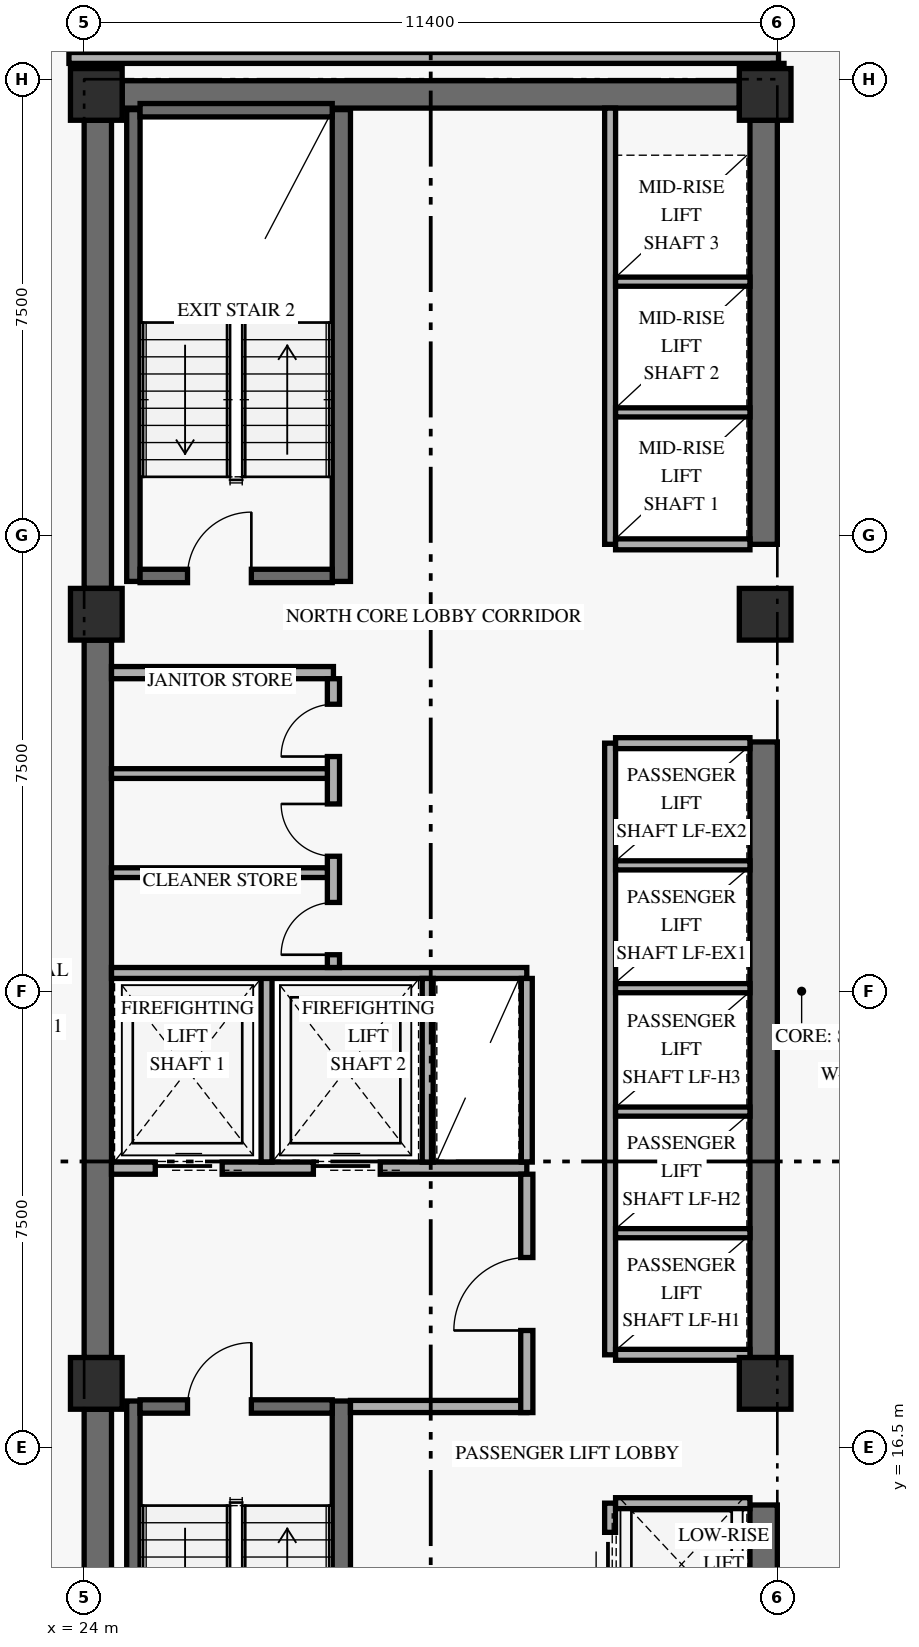
"""IFC4 building model, lengths in metres.
Left out: names, types, materials, properties, quantities, classifications, styles, units other than length and angle.
Written with IfcOpenShell. Run it as: python <this file> out.ifc"""

import sys

from ifc_helpers import new_model, si_unit, direction, frame, frame_2d, origin, origin_2d, place, context, subcontext, project, spatial, rectangle, extrude, element, fill, save


model = new_model("IFC4")
c1 = context("Model", 3, precision=1e-05, world=origin(), true_north=direction((0.0, 1.0)))
c2 = subcontext(c1, "Body", "Model", "MODEL_VIEW")
j1 = project(units=[si_unit("LENGTHUNIT", "METRE"), si_unit("PLANEANGLEUNIT", "RADIAN")], contexts=[c1])
p1 = place(None, origin())
s1 = spatial("IfcSite", under=j1, at=p1, CompositionType="ELEMENT")
p2 = place(p1, origin())
s2 = spatial("IfcBuilding", under=s1, at=p2, CompositionType="ELEMENT")
p3 = place(p2, frame((0.0, 0.0, 64.2)))
s3 = spatial("IfcBuildingStorey", under=s2, at=p3, CompositionType="ELEMENT", Elevation=64.2)
p4 = place(p3, frame((24.225, 9.675, 0.0), z_axis=(0.0, 0.0, 1.0), x_axis=(0.0, 1.0, 0.0)))
e1 = element("IfcWall", 1, at=p4, inside=s3, PredefinedType="SHEAR", context=c2, shape_type="SweptSolid", body=[
    extrude(rectangle(XDim=7.45, YDim=0.45, at=frame_2d((3.725, 0.0))), origin(), (0.0, 0.0, 1.0), 2.667),
])
p5 = place(p3, frame((24.225, 17.975, 0.0), z_axis=(0.0, 0.0, 1.0), x_axis=(0.0, 1.0, 0.0)))
e2 = element("IfcWall", 2, at=p5, inside=s3, PredefinedType="SHEAR", context=c2, shape_type="SweptSolid", body=[
    extrude(rectangle(XDim=11.8, YDim=0.45, at=frame_2d((5.9, 0.0))), origin(), (0.0, 0.0, 1.0), 2.667),
])
p6 = place(p3, frame((24.225, 30.625, 0.0), z_axis=(0.0, 0.0, 1.0), x_axis=(0.0, 1.0, 0.0)))
e3 = element("IfcWall", 3, at=p6, inside=s3, PredefinedType="SHEAR", context=c2, shape_type="SweptSolid", body=[
    extrude(rectangle(XDim=7.7, YDim=0.45, at=frame_2d((3.85, 0.0))), origin(), (0.0, 0.0, 1.0), 2.667),
])
p7 = place(p3, frame((35.175, 9.675, 0.0), z_axis=(0.0, 0.0, 1.0), x_axis=(0.0, 1.0, 0.0)))
e4 = element("IfcWall", 4, at=p7, inside=s3, PredefinedType="SHEAR", context=c2, shape_type="SweptSolid", body=[
    extrude(rectangle(XDim=5.875, YDim=0.45, at=frame_2d((2.938, 0.0))), origin(), (0.0, 0.0, 1.0), 2.667),
])
p8 = place(p3, frame((35.175, 17.975, 0.0), z_axis=(0.0, 0.0, 1.0), x_axis=(0.0, 1.0, 0.0)))
e5 = element("IfcWall", 5, at=p8, inside=s3, PredefinedType="SHEAR", context=c2, shape_type="SweptSolid", body=[
    extrude(rectangle(XDim=10.125, YDim=0.45, at=frame_2d((5.062, 0.0))), origin(), (0.0, 0.0, 1.0), 2.667),
])
p9 = place(p3, frame((35.175, 31.35, 0.0), z_axis=(0.0, 0.0, 1.0), x_axis=(0.0, 1.0, 0.0)))
e6 = element("IfcWall", 6, at=p9, inside=s3, PredefinedType="SHEAR", context=c2, shape_type="SweptSolid", body=[
    extrude(rectangle(XDim=6.975, YDim=0.45, at=frame_2d((3.487, 0.0))), origin(), (0.0, 0.0, 1.0), 2.667),
])
p10 = place(p3, frame((24.625, 38.75, 0.0), z_axis=(0.0, 0.0, 1.0), x_axis=(1.0, 0.0, 0.0)))
e7 = element("IfcWall", 7, at=p10, inside=s3, PredefinedType="SHEAR", context=c2, shape_type="SweptSolid", body=[
    extrude(rectangle(XDim=10.15, YDim=0.45, at=frame_2d((5.075, 0.0))), origin(), (0.0, 0.0, 1.0), 3.36),
])
p11 = place(p3, frame((24.81, 9.5, 0.0), z_axis=(0.0, 0.0, 1.0), x_axis=(0.0, 1.0, 0.0)))
e8 = element("IfcWall", 8, at=p11, inside=s3, PredefinedType="SHEAR", context=c2, shape_type="SweptSolid", body=[
    extrude(rectangle(XDim=7.76, YDim=0.22, at=frame_2d((3.88, 0.0))), origin(), (0.0, 0.0, 1.0), 3.36),
])
p12 = place(p3, frame((28.23, 9.5, 0.0), z_axis=(0.0, 0.0, 1.0), x_axis=(0.0, 1.0, 0.0)))
e9 = element("IfcWall", 9, at=p12, inside=s3, PredefinedType="SHEAR", context=c2, shape_type="SweptSolid", body=[
    extrude(rectangle(XDim=7.76, YDim=0.3, at=frame_2d((3.88, 0.0))), origin(), (0.0, 0.0, 1.0), 3.36),
])
p13 = place(p3, frame((24.92, 17.17, 0.0), z_axis=(0.0, 0.0, 1.0), x_axis=(1.0, 0.0, 0.0)))
e10 = element("IfcWall", 10, at=p13, inside=s3, PredefinedType="SHEAR", context=c2, shape_type="SweptSolid", body=[
    extrude(rectangle(XDim=3.16, YDim=0.22, at=frame_2d((1.58, 0.0))), origin(), (0.0, 0.0, 1.0), 3.36),
])
p14 = place(p13, frame((0.78, 0.0, 0.0)))
e11 = element("IfcOpeningElement", 11, at=p14, cuts=e10, PredefinedType="OPENING", context=c2, shape_type="SweptSolid", body=[
    extrude(rectangle(XDim=1.05, YDim=2.15, at=frame_2d((0.525, 1.075))), frame((0.0, 0.12, 0.0), z_axis=(0.0, -1.0, 0.0), x_axis=(1.0, 0.0, 0.0)), (0.0, 0.0, 1.0), 0.24),
])
p15 = place(p3, frame((24.81, 30.74, 0.0), z_axis=(0.0, 0.0, 1.0), x_axis=(0.0, 1.0, 0.0)))
e12 = element("IfcWall", 12, at=p15, inside=s3, PredefinedType="SHEAR", context=c2, shape_type="SweptSolid", body=[
    extrude(rectangle(XDim=7.76, YDim=0.22, at=frame_2d((3.88, 0.0))), origin(), (0.0, 0.0, 1.0), 3.36),
])
p16 = place(p3, frame((28.23, 30.74, 0.0), z_axis=(0.0, 0.0, 1.0), x_axis=(0.0, 1.0, 0.0)))
e13 = element("IfcWall", 13, at=p16, inside=s3, PredefinedType="SHEAR", context=c2, shape_type="SweptSolid", body=[
    extrude(rectangle(XDim=7.76, YDim=0.3, at=frame_2d((3.88, 0.0))), origin(), (0.0, 0.0, 1.0), 3.36),
])
p17 = place(p3, frame((24.92, 30.83, 0.0), z_axis=(0.0, 0.0, 1.0), x_axis=(1.0, 0.0, 0.0)))
e14 = element("IfcWall", 14, at=p17, inside=s3, PredefinedType="SHEAR", context=c2, shape_type="SweptSolid", body=[
    extrude(rectangle(XDim=3.16, YDim=0.22, at=frame_2d((1.58, 0.0))), origin(), (0.0, 0.0, 1.0), 3.36),
])
p18 = place(p17, frame((0.78, 0.0, 0.0)))
e15 = element("IfcOpeningElement", 15, at=p18, cuts=e14, PredefinedType="OPENING", context=c2, shape_type="SweptSolid", body=[
    extrude(rectangle(XDim=1.05, YDim=2.15, at=frame_2d((0.525, 1.075))), frame((0.0, 0.12, 0.0), z_axis=(0.0, -1.0, 0.0), x_axis=(1.0, 0.0, 0.0)), (0.0, 0.0, 1.0), 0.24),
])
p19 = place(p3, frame((24.92, 38.49, 0.0), z_axis=(0.0, 0.0, 1.0), x_axis=(1.0, 0.0, 0.0)))
e16 = element("IfcWall", 16, at=p19, inside=s3, PredefinedType="SHEAR", context=c2, shape_type="SweptSolid", body=[
    extrude(rectangle(XDim=3.16, YDim=0.22, at=frame_2d((1.58, 0.0))), origin(), (0.0, 0.0, 1.0), 3.36),
])
for number, where, z_axis, x_axis in (
    (17, (24.2, 17.55, 0.0), (0.0, 0.0, 1.0), (1.0, 0.0, 0.0)),
    (18, (24.2, 30.2, 0.0), (0.0, 0.0, 1.0), (1.0, 0.0, 0.0)),
    (19, (24.2, 38.75, 0.0), (0.0, 0.0, 1.0), (1.0, 0.0, 0.0)),
    (20, (35.2, 17.55, 0.0), (0.0, 0.0, 1.0), (1.0, 0.0, 0.0)),
    (21, (35.2, 30.2, 0.0), (0.0, 0.0, 1.0), (1.0, 0.0, 0.0)),
    (22, (35.2, 38.75, 0.0), (0.0, 0.0, 1.0), (1.0, 0.0, 0.0)),
):
    element("IfcColumn", number, at=place(p3, frame(where, z_axis=z_axis, x_axis=x_axis)), inside=s3, PredefinedType="COLUMN", context=c2, shape_type="SweptSolid", body=[
        extrude(rectangle(XDim=0.85, YDim=0.85, at=origin_2d()), origin(), (0.0, 0.0, 1.0), 3.6),
    ])
p20 = place(p3, frame((24.45, 21.09, 0.0), z_axis=(0.0, 0.0, 1.0), x_axis=(1.0, 0.0, 0.0)))
e23 = element("IfcWall", 23, at=p20, inside=s3, PredefinedType="STANDARD", context=c2, shape_type="SweptSolid", body=[
    extrude(rectangle(XDim=6.83, YDim=0.2, at=frame_2d((3.415, 0.0))), origin(), (0.0, 0.0, 1.0), 3.36),
])
p21 = place(p20, frame((0.72, 0.0, 0.0)))
e24 = element("IfcOpeningElement", 24, at=p21, cuts=e23, PredefinedType="OPENING", context=c2, shape_type="SweptSolid", body=[
    extrude(rectangle(XDim=1.1, YDim=2.2, at=frame_2d((0.55, 1.1))), frame((0.0, 0.11, 0.0), z_axis=(0.0, -1.0, 0.0), x_axis=(1.0, 0.0, 0.0)), (0.0, 0.0, 1.0), 0.22),
])
p22 = place(p20, frame((3.32, 0.0, 0.0)))
e25 = element("IfcOpeningElement", 25, at=p22, cuts=e23, PredefinedType="OPENING", context=c2, shape_type="SweptSolid", body=[
    extrude(rectangle(XDim=1.1, YDim=2.2, at=frame_2d((0.55, 1.1))), frame((0.0, 0.11, 0.0), z_axis=(0.0, -1.0, 0.0), x_axis=(1.0, 0.0, 0.0)), (0.0, 0.0, 1.0), 0.22),
])
p23 = place(p3, frame((28.38, 17.17, 0.0), z_axis=(0.0, 0.0, 1.0), x_axis=(1.0, 0.0, 0.0)))
e26 = element("IfcWall", 26, at=p23, inside=s3, PredefinedType="STANDARD", context=c2, shape_type="SweptSolid", body=[
    extrude(rectangle(XDim=2.9, YDim=0.2, at=frame_2d((1.45, 0.0))), origin(), (0.0, 0.0, 1.0), 3.36),
])
p24 = place(p3, frame((31.28, 17.07, 0.0), z_axis=(0.0, 0.0, 1.0), x_axis=(0.0, 1.0, 0.0)))
e27 = element("IfcWall", 27, at=p24, inside=s3, PredefinedType="STANDARD", context=c2, shape_type="SweptSolid", body=[
    extrude(rectangle(XDim=3.92, YDim=0.2, at=frame_2d((1.96, 0.0))), origin(), (0.0, 0.0, 1.0), 2.649),
])
p25 = place(p24, frame((1.35, 0.0, 0.0)))
e28 = element("IfcOpeningElement", 28, at=p25, cuts=e27, PredefinedType="OPENING", context=c2, shape_type="SweptSolid", body=[
    extrude(rectangle(XDim=1.2, YDim=2.15, at=frame_2d((0.6, 1.075))), frame((0.0, 0.11, 0.0), z_axis=(0.0, -1.0, 0.0), x_axis=(1.0, 0.0, 0.0)), (0.0, 0.0, 1.0), 0.22),
])
p26 = place(p3, frame((27.0, 21.19, 0.0), z_axis=(0.0, 0.0, 1.0), x_axis=(0.0, 1.0, 0.0)))
e29 = element("IfcWall", 29, at=p26, inside=s3, PredefinedType="STANDARD", context=c2, shape_type="SweptSolid", body=[
    extrude(rectangle(XDim=3.11, YDim=0.18, at=frame_2d((1.555, 0.0))), origin(), (0.0, 0.0, 1.0), 3.36),
])
p27 = place(p3, frame((24.45, 24.3, 0.0), z_axis=(0.0, 0.0, 1.0), x_axis=(1.0, 0.0, 0.0)))
e30 = element("IfcWall", 30, at=p27, inside=s3, PredefinedType="STANDARD", context=c2, shape_type="SweptSolid", body=[
    extrude(rectangle(XDim=6.83, YDim=0.18, at=frame_2d((3.415, 0.0))), origin(), (0.0, 0.0, 1.0), 3.36),
])
for number, where, z_axis, x_axis in (
    (31, (29.65, 21.19, 0.0), (0.0, 0.0, 1.0), (0.0, 1.0, 0.0)),
    (32, (31.28, 21.19, 0.0), (0.0, 0.0, 1.0), (0.0, 1.0, 0.0)),
):
    element("IfcWall", number, at=place(p3, frame(where, z_axis=z_axis, x_axis=x_axis)), inside=s3, PredefinedType="STANDARD", context=c2, shape_type="SweptSolid", body=[
        extrude(rectangle(XDim=3.02, YDim=0.18, at=frame_2d((1.51, 0.0))), origin(), (0.0, 0.0, 1.0), 3.36),
    ])
p28 = place(p3, frame((24.45, 29.24, 0.0), z_axis=(0.0, 0.0, 1.0), x_axis=(1.0, 0.0, 0.0)))
e33 = element("IfcWall", 33, at=p28, inside=s3, PredefinedType="STANDARD", context=c2, shape_type="SweptSolid", body=[
    extrude(rectangle(XDim=3.65, YDim=0.2, at=frame_2d((1.825, 0.0))), origin(), (0.0, 0.0, 1.0), 3.36),
])
p29 = place(p3, frame((28.1, 24.39, 0.0), z_axis=(0.0, 0.0, 1.0), x_axis=(0.0, 1.0, 0.0)))
e34 = element("IfcWall", 34, at=p29, inside=s3, PredefinedType="STANDARD", context=c2, shape_type="SweptSolid", body=[
    extrude(rectangle(XDim=4.75, YDim=0.2, at=frame_2d((2.375, 0.0))), origin(), (0.0, 0.0, 1.0), 3.36),
])
p30 = place(p29, frame((0.21, 0.0, 0.0)))
e35 = element("IfcOpeningElement", 35, at=p30, cuts=e34, PredefinedType="OPENING", context=c2, shape_type="SweptSolid", body=[
    extrude(rectangle(XDim=0.86, YDim=2.1, at=frame_2d((0.43, 1.05))), frame((0.0, 0.11, 0.0), z_axis=(0.0, -1.0, 0.0), x_axis=(1.0, 0.0, 0.0)), (0.0, 0.0, 1.0), 0.22),
])
p31 = place(p29, frame((1.83, 0.0, 0.0)))
e36 = element("IfcOpeningElement", 36, at=p31, cuts=e34, PredefinedType="OPENING", context=c2, shape_type="SweptSolid", body=[
    extrude(rectangle(XDim=0.86, YDim=2.1, at=frame_2d((0.43, 1.05))), frame((0.0, 0.11, 0.0), z_axis=(0.0, -1.0, 0.0), x_axis=(1.0, 0.0, 0.0)), (0.0, 0.0, 1.0), 0.22),
])
p32 = place(p29, frame((3.47, 0.0, 0.0)))
e37 = element("IfcOpeningElement", 37, at=p32, cuts=e34, PredefinedType="OPENING", context=c2, shape_type="SweptSolid", body=[
    extrude(rectangle(XDim=0.86, YDim=2.1, at=frame_2d((0.43, 1.05))), frame((0.0, 0.11, 0.0), z_axis=(0.0, -1.0, 0.0), x_axis=(1.0, 0.0, 0.0)), (0.0, 0.0, 1.0), 0.22),
])
for number, where, z_axis, x_axis in (
    (38, (24.45, 25.95, 0.0), (0.0, 0.0, 1.0), (1.0, 0.0, 0.0)),
    (39, (24.45, 27.58, 0.0), (0.0, 0.0, 1.0), (1.0, 0.0, 0.0)),
):
    element("IfcWall", number, at=place(p3, frame(where, z_axis=z_axis, x_axis=x_axis)), inside=s3, PredefinedType="PARTITIONING", context=c2, shape_type="SweptSolid", body=[
        extrude(rectangle(XDim=3.55, YDim=0.16, at=frame_2d((1.775, 0.0))), origin(), (0.0, 0.0, 1.0), 3.36),
    ])
p33 = place(p3, frame((32.65, 9.5, 0.0), z_axis=(0.0, 0.0, 1.0), x_axis=(0.0, 1.0, 0.0)))
e40 = element("IfcWall", 40, at=p33, inside=s3, PredefinedType="STANDARD", context=c2, shape_type="SweptSolid", body=[
    extrude(rectangle(XDim=6.08, YDim=0.18, at=frame_2d((3.04, 0.0))), origin(), (0.0, 0.0, 1.0), 3.36),
])
p34 = place(p33, frame((0.55, 0.0, 0.0)))
e41 = element("IfcOpeningElement", 41, at=p34, cuts=e40, PredefinedType="OPENING", context=c2, shape_type="SweptSolid", body=[
    extrude(rectangle(XDim=1.05, YDim=2.2, at=frame_2d((0.525, 1.1))), frame((0.0, 0.1, 0.0), z_axis=(0.0, -1.0, 0.0), x_axis=(1.0, 0.0, 0.0)), (0.0, 0.0, 1.0), 0.2),
])
p35 = place(p33, frame((2.55, 0.0, 0.0)))
e42 = element("IfcOpeningElement", 42, at=p35, cuts=e40, PredefinedType="OPENING", context=c2, shape_type="SweptSolid", body=[
    extrude(rectangle(XDim=1.05, YDim=2.2, at=frame_2d((0.525, 1.1))), frame((0.0, 0.1, 0.0), z_axis=(0.0, -1.0, 0.0), x_axis=(1.0, 0.0, 0.0)), (0.0, 0.0, 1.0), 0.2),
])
p36 = place(p33, frame((4.55, 0.0, 0.0)))
e43 = element("IfcOpeningElement", 43, at=p36, cuts=e40, PredefinedType="OPENING", context=c2, shape_type="SweptSolid", body=[
    extrude(rectangle(XDim=1.05, YDim=2.2, at=frame_2d((0.525, 1.1))), frame((0.0, 0.1, 0.0), z_axis=(0.0, -1.0, 0.0), x_axis=(1.0, 0.0, 0.0)), (0.0, 0.0, 1.0), 0.2),
])
p37 = place(p3, frame((32.74, 15.58, 0.0), z_axis=(0.0, 0.0, 1.0), x_axis=(1.0, 0.0, 0.0)))
e44 = element("IfcWall", 44, at=p37, inside=s3, PredefinedType="STANDARD", context=c2, shape_type="SweptSolid", body=[
    extrude(rectangle(XDim=2.21, YDim=0.18, at=frame_2d((1.105, 0.0))), origin(), (0.0, 0.0, 1.0), 3.36),
])
p38 = place(p3, frame((32.65, 18.02, 0.0), z_axis=(0.0, 0.0, 1.0), x_axis=(0.0, 1.0, 0.0)))
e45 = element("IfcWall", 45, at=p38, inside=s3, PredefinedType="STANDARD", context=c2, shape_type="SweptSolid", body=[
    extrude(rectangle(XDim=10.06, YDim=0.18, at=frame_2d((5.03, 0.0))), origin(), (0.0, 0.0, 1.0), 3.36),
])
for number, where, z_axis, x_axis in (
    (46, (32.74, 18.02, 0.0), (0.0, 0.0, 1.0), (1.0, 0.0, 0.0)),
    (47, (32.74, 28.08, 0.0), (0.0, 0.0, 1.0), (1.0, 0.0, 0.0)),
):
    element("IfcWall", number, at=place(p3, frame(where, z_axis=z_axis, x_axis=x_axis)), inside=s3, PredefinedType="STANDARD", context=c2, shape_type="SweptSolid", body=[
        extrude(rectangle(XDim=2.21, YDim=0.18, at=frame_2d((1.105, 0.0))), origin(), (0.0, 0.0, 1.0), 3.36),
    ])
for number, where, z_axis, x_axis in (
    (48, (32.74, 20.02, 0.0), (0.0, 0.0, 1.0), (1.0, 0.0, 0.0)),
    (49, (32.74, 22.02, 0.0), (0.0, 0.0, 1.0), (1.0, 0.0, 0.0)),
    (50, (32.74, 24.05, 0.0), (0.0, 0.0, 1.0), (1.0, 0.0, 0.0)),
    (51, (32.74, 26.07, 0.0), (0.0, 0.0, 1.0), (1.0, 0.0, 0.0)),
):
    element("IfcWall", number, at=place(p3, frame(where, z_axis=z_axis, x_axis=x_axis)), inside=s3, PredefinedType="STANDARD", context=c2, shape_type="SweptSolid", body=[
        extrude(rectangle(XDim=2.21, YDim=0.15, at=frame_2d((1.105, 0.0))), origin(), (0.0, 0.0, 1.0), 3.36),
    ])
p39 = place(p3, frame((32.65, 31.35, 0.0), z_axis=(0.0, 0.0, 1.0), x_axis=(0.0, 1.0, 0.0)))
e52 = element("IfcWall", 52, at=p39, inside=s3, PredefinedType="STANDARD", context=c2, shape_type="SweptSolid", body=[
    extrude(rectangle(XDim=7.175, YDim=0.18, at=frame_2d((3.587, 0.0))), origin(), (0.0, 0.0, 1.0), 3.36),
])
p40 = place(p3, frame((32.74, 31.35, 0.0), z_axis=(0.0, 0.0, 1.0), x_axis=(1.0, 0.0, 0.0)))
e53 = element("IfcWall", 53, at=p40, inside=s3, PredefinedType="STANDARD", context=c2, shape_type="SweptSolid", body=[
    extrude(rectangle(XDim=2.21, YDim=0.18, at=frame_2d((1.105, 0.0))), origin(), (0.0, 0.0, 1.0), 3.36),
])
for number, where, z_axis, x_axis in (
    (54, (32.74, 33.52, 0.0), (0.0, 0.0, 1.0), (1.0, 0.0, 0.0)),
    (55, (32.74, 35.67, 0.0), (0.0, 0.0, 1.0), (1.0, 0.0, 0.0)),
):
    element("IfcWall", number, at=place(p3, frame(where, z_axis=z_axis, x_axis=x_axis)), inside=s3, PredefinedType="STANDARD", context=c2, shape_type="SweptSolid", body=[
        extrude(rectangle(XDim=2.21, YDim=0.15, at=frame_2d((1.105, 0.0))), origin(), (0.0, 0.0, 1.0), 3.36),
    ])
p41 = place(p3, frame((23.75, 39.35, 0.0), z_axis=(0.0, 0.0, 1.0), x_axis=(1.0, 0.0, 0.0)))
e56 = element("IfcWall", 56, at=p41, inside=s3, PredefinedType="STANDARD", context=c2, shape_type="SweptSolid", body=[
    extrude(rectangle(XDim=11.67, YDim=0.18, at=frame_2d((5.835, 0.0))), origin(), (0.0, 0.0, 1.0), 2.649),
])
p42 = place(p3, frame((35.42, 38.75, 0.0), z_axis=(0.0, 0.0, 1.0), x_axis=(0.0, 1.0, 0.0)))
e57 = element("IfcWall", 57, at=p42, inside=s3, PredefinedType="STANDARD", context=c2, shape_type="SweptSolid", body=[
    extrude(rectangle(XDim=0.51, YDim=0.18, at=frame_2d((0.255, 0.0))), origin(), (0.0, 0.0, 1.0), 3.36),
])
p43 = place(p14, frame((1.05, 0.0, 0.0), z_axis=(0.0, 0.0, 1.0), x_axis=(-1.0, 0.0, 0.0)))
e58 = element("IfcDoor", 58, at=p43, inside=s3, OperationType="SINGLE_SWING_LEFT", PredefinedType="DOOR", context=c2, shape_type="SweptSolid", body=[
    extrude(rectangle(XDim=1.05, YDim=2.15, at=frame_2d((0.525, 1.075))), frame((0.0, 0.025, 0.0), z_axis=(0.0, -1.0, 0.0), x_axis=(1.0, 0.0, 0.0)), (0.0, 0.0, 1.0), 0.05),
])
fill(e11, e58)
p44 = place(p18, origin())
e59 = element("IfcDoor", 59, at=p44, inside=s3, OperationType="SINGLE_SWING_RIGHT", PredefinedType="DOOR", context=c2, shape_type="SweptSolid", body=[
    extrude(rectangle(XDim=1.05, YDim=2.15, at=frame_2d((0.525, 1.075))), frame((0.0, 0.025, 0.0), z_axis=(0.0, -1.0, 0.0), x_axis=(1.0, 0.0, 0.0)), (0.0, 0.0, 1.0), 0.05),
])
fill(e15, e59)
p45 = place(p21, origin())
e60 = element("IfcDoor", 60, at=p45, inside=s3, OperationType="SLIDING_TO_LEFT", PredefinedType="DOOR", context=c2, shape_type="SweptSolid", body=[
    extrude(rectangle(XDim=1.1, YDim=2.2, at=frame_2d((0.55, 1.1))), frame((0.0, 0.025, 0.0), z_axis=(0.0, -1.0, 0.0), x_axis=(1.0, 0.0, 0.0)), (0.0, 0.0, 1.0), 0.05),
])
fill(e24, e60)
p46 = place(p22, origin())
e61 = element("IfcDoor", 61, at=p46, inside=s3, OperationType="SLIDING_TO_LEFT", PredefinedType="DOOR", context=c2, shape_type="SweptSolid", body=[
    extrude(rectangle(XDim=1.1, YDim=2.2, at=frame_2d((0.55, 1.1))), frame((0.0, 0.025, 0.0), z_axis=(0.0, -1.0, 0.0), x_axis=(1.0, 0.0, 0.0)), (0.0, 0.0, 1.0), 0.05),
])
fill(e25, e61)
p47 = place(p25, origin())
e62 = element("IfcDoor", 62, at=p47, inside=s3, OperationType="SINGLE_SWING_LEFT", PredefinedType="DOOR", context=c2, shape_type="SweptSolid", body=[
    extrude(rectangle(XDim=1.2, YDim=2.15, at=frame_2d((0.6, 1.075))), frame((0.0, 0.025, 0.0), z_axis=(0.0, -1.0, 0.0), x_axis=(1.0, 0.0, 0.0)), (0.0, 0.0, 1.0), 0.05),
])
fill(e28, e62)
p48 = place(p30, origin())
e63 = element("IfcDoor", 63, at=p48, inside=s3, OperationType="SINGLE_SWING_LEFT", PredefinedType="DOOR", context=c2, shape_type="SweptSolid", body=[
    extrude(rectangle(XDim=0.86, YDim=2.1, at=frame_2d((0.43, 1.05))), frame((0.0, 0.025, 0.0), z_axis=(0.0, -1.0, 0.0), x_axis=(1.0, 0.0, 0.0)), (0.0, 0.0, 1.0), 0.05),
])
fill(e35, e63)
p49 = place(p31, origin())
e64 = element("IfcDoor", 64, at=p49, inside=s3, OperationType="SINGLE_SWING_RIGHT", PredefinedType="DOOR", context=c2, shape_type="SweptSolid", body=[
    extrude(rectangle(XDim=0.86, YDim=2.1, at=frame_2d((0.43, 1.05))), frame((0.0, 0.025, 0.0), z_axis=(0.0, -1.0, 0.0), x_axis=(1.0, 0.0, 0.0)), (0.0, 0.0, 1.0), 0.05),
])
fill(e36, e64)
p50 = place(p32, origin())
e65 = element("IfcDoor", 65, at=p50, inside=s3, OperationType="SINGLE_SWING_LEFT", PredefinedType="DOOR", context=c2, shape_type="SweptSolid", body=[
    extrude(rectangle(XDim=0.86, YDim=2.1, at=frame_2d((0.43, 1.05))), frame((0.0, 0.025, 0.0), z_axis=(0.0, -1.0, 0.0), x_axis=(1.0, 0.0, 0.0)), (0.0, 0.0, 1.0), 0.05),
])
fill(e37, e65)
p51 = place(p36, origin())
e66 = element("IfcDoor", 66, at=p51, inside=s3, OperationType="SLIDING_TO_LEFT", PredefinedType="DOOR", context=c2, shape_type="SweptSolid", body=[
    extrude(rectangle(XDim=1.05, YDim=2.2, at=frame_2d((0.525, 1.1))), frame((0.0, 0.025, 0.0), z_axis=(0.0, -1.0, 0.0), x_axis=(1.0, 0.0, 0.0)), (0.0, 0.0, 1.0), 0.05),
])
fill(e43, e66)
save(model, sys.argv[1])
